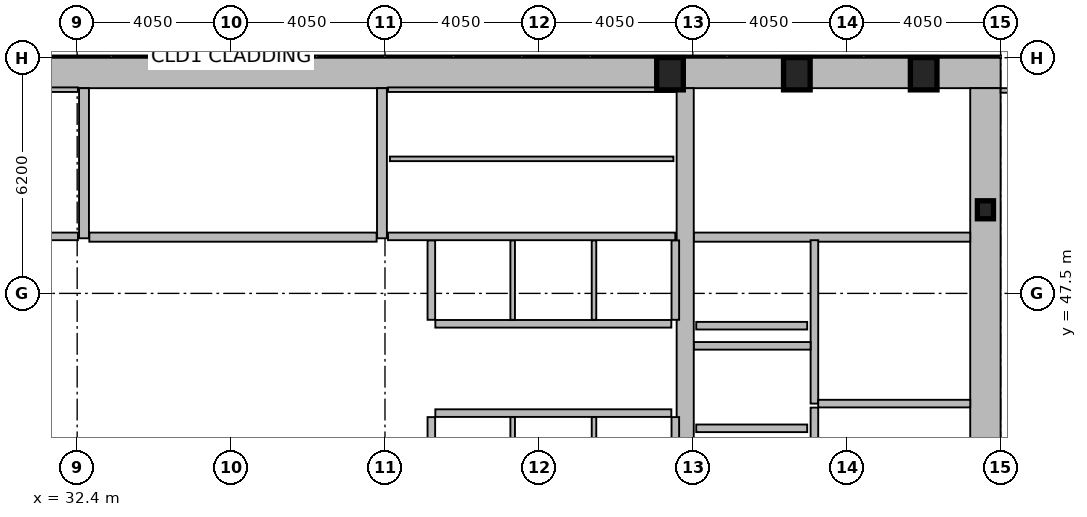
"""IFC4 building model, lengths in metres.
Left out: names, types, materials, properties, quantities, classifications, styles, units other than length and angle.
Written with IfcOpenShell. Run it as: python <this file> out.ifc"""

import sys

from ifc_helpers import new_model, si_unit, direction, frame, frame_2d, origin, origin_2d, place, context, subcontext, project, spatial, rectangle, hollow_rectangle, i_section, extrude, element, fill, save


model = new_model("IFC4")
c1 = context("Model", 3, precision=1e-05, world=origin(), true_north=direction((0.0, 1.0)))
c2 = subcontext(c1, "Body", "Model", "MODEL_VIEW")
j1 = project(units=[si_unit("LENGTHUNIT", "METRE"), si_unit("PLANEANGLEUNIT", "RADIAN")], contexts=[c1])
p1 = place(None, origin())
s1 = spatial("IfcSite", under=j1, at=p1, CompositionType="ELEMENT")
p2 = place(p1, origin())
s2 = spatial("IfcBuilding", under=s1, at=p2, CompositionType="ELEMENT")
p3 = place(p2, frame((0.0, 0.0, 85.8)))
s3 = spatial("IfcBuildingStorey", under=s2, at=p3, CompositionType="ELEMENT", Elevation=85.8)
p4 = place(p3, frame((16.2, 53.3, 0.0), z_axis=(0.0, 0.0, 1.0), x_axis=(1.0, 0.0, 0.0)))
e1 = element("IfcWall", 1, at=p4, inside=s3, PredefinedType="SHEAR", context=c2, shape_type="SweptSolid", body=[
    extrude(rectangle(XDim=40.5, YDim=0.8, at=frame_2d((20.25, 0.0))), origin(), (0.0, 0.0, 1.0), 4.62),
])
p5 = place(p3, frame((56.3, 52.9, 0.0), z_axis=(0.0, 0.0, 1.0), x_axis=(0.0, -1.0, 0.0)))
e2 = element("IfcWall", 2, at=p5, inside=s3, PredefinedType="SHEAR", context=c2, shape_type="SweptSolid", body=[
    extrude(rectangle(XDim=10.8, YDim=0.8, at=frame_2d((5.4, 0.0))), origin(), (0.0, 0.0, 1.0), 4.62),
])
p6 = place(p3, frame((48.4, 42.1, 0.0), z_axis=(0.0, 0.0, 1.0), x_axis=(0.0, 1.0, 0.0)))
e3 = element("IfcWall", 3, at=p6, inside=s3, PredefinedType="SHEAR", context=c2, shape_type="SweptSolid", body=[
    extrude(rectangle(XDim=10.8, YDim=0.45, at=frame_2d((5.4, 0.0))), origin(), (0.0, 0.0, 1.0), 4.62),
])
for number, where, z_axis, x_axis in (
    (4, (32.58, 48.95, 0.0), (0.0, 0.0, 1.0), (0.0, 1.0, 0.0)),
    (5, (40.42, 48.95, 0.0), (0.0, 0.0, 1.0), (0.0, 1.0, 0.0)),
):
    element("IfcWall", number, at=place(p3, frame(where, z_axis=z_axis, x_axis=x_axis)), inside=s3, PredefinedType="SHEAR", context=c2, shape_type="SweptSolid", body=[
        extrude(rectangle(XDim=3.95, YDim=0.26, at=frame_2d((1.975, 0.0))), origin(), (0.0, 0.0, 1.0), 4.62),
    ])
p7 = place(p3, frame((48.63, 48.98, 0.0), z_axis=(0.0, 0.0, 1.0), x_axis=(1.0, 0.0, 0.0)))
e6 = element("IfcWall", 6, at=p7, inside=s3, PredefinedType="SHEAR", context=c2, shape_type="SweptSolid", body=[
    extrude(rectangle(XDim=7.27, YDim=0.24, at=frame_2d((3.635, 0.0))), origin(), (0.0, 0.0, 1.0), 4.62),
])
p8 = place(p7, frame((6.0, 0.0, 0.0)))
e7 = element("IfcOpeningElement", 7, at=p8, cuts=e6, PredefinedType="OPENING", context=c2, shape_type="SweptSolid", body=[
    extrude(rectangle(XDim=1.05, YDim=2.15, at=frame_2d((0.525, 1.075))), frame((0.0, 0.13, 0.0), z_axis=(0.0, -1.0, 0.0), x_axis=(1.0, 0.0, 0.0)), (0.0, 0.0, 1.0), 0.26),
])
p9 = place(p3, frame((32.72, 48.98, 0.0), z_axis=(0.0, 0.0, 1.0), x_axis=(1.0, 0.0, 0.0)))
e8 = element("IfcWall", 8, at=p9, inside=s3, PredefinedType="SHEAR", context=c2, shape_type="SweptSolid", body=[
    extrude(rectangle(XDim=7.56, YDim=0.24, at=frame_2d((3.78, 0.0))), origin(), (0.0, 0.0, 1.0), 4.62),
])
p10 = place(p9, frame((0.22, 0.0, 0.0)))
e9 = element("IfcOpeningElement", 9, at=p10, cuts=e8, PredefinedType="OPENING", context=c2, shape_type="SweptSolid", body=[
    extrude(rectangle(XDim=1.05, YDim=2.15, at=frame_2d((0.525, 1.075))), frame((0.0, 0.13, 0.0), z_axis=(0.0, -1.0, 0.0), x_axis=(1.0, 0.0, 0.0)), (0.0, 0.0, 1.0), 0.26),
])
for number, where, z_axis, x_axis in (
    (10, (48.0, 53.28, 0.0), (0.0, 0.0, 1.0), (1.0, 0.0, 0.0)),
    (11, (51.337, 53.28, 0.0), (0.0, 0.0, 1.0), (1.0, 0.0, 0.0)),
    (12, (54.675, 53.28, 0.0), (0.0, 0.0, 1.0), (1.0, 0.0, 0.0)),
):
    element("IfcColumn", number, at=place(p3, frame(where, z_axis=z_axis, x_axis=x_axis)), inside=s3, PredefinedType="COLUMN", context=c2, shape_type="SweptSolid", body=[
        extrude(hollow_rectangle(XDim=0.7, YDim=0.85, WallThickness=0.05, at=origin_2d()), origin(), (0.0, 0.0, 1.0), 4.8),
    ])
p11 = place(p3, frame((56.3, 49.7, 0.0), z_axis=(0.0, 0.0, 1.0), x_axis=(1.0, 0.0, 0.0)))
e13 = element("IfcColumn", 13, at=p11, inside=s3, PredefinedType="COLUMN", context=c2, shape_type="SweptSolid", body=[
    extrude(i_section(OverallWidth=0.424, OverallDepth=0.474, WebThickness=0.048, FlangeThickness=0.077, at=origin_2d()), origin(), (0.0, 0.0, 1.0), 4.8),
])
p12 = place(p3, frame((51.61, 43.95, 0.0), z_axis=(0.0, 0.0, 1.0), x_axis=(-1.0, 0.0, 0.0)))
e14 = element("IfcWall", 14, at=p12, inside=s3, PredefinedType="PARTITIONING", context=c2, shape_type="SweptSolid", body=[
    extrude(rectangle(XDim=2.92, YDim=0.2, at=frame_2d((1.46, 0.0))), origin(), (0.0, 0.0, 1.0), 4.62),
])
p13 = place(p12, frame((0.81, 0.0, 0.0)))
e15 = element("IfcOpeningElement", 15, at=p13, cuts=e14, PredefinedType="OPENING", context=c2, shape_type="SweptSolid", body=[
    extrude(rectangle(XDim=1.3, YDim=2.18, at=frame_2d((0.65, 1.09))), frame((0.0, 0.11, 0.0), z_axis=(0.0, -1.0, 0.0), x_axis=(1.0, 0.0, 0.0)), (0.0, 0.0, 1.0), 0.22),
])
p14 = place(p3, frame((51.61, 46.65, 0.0), z_axis=(0.0, 0.0, 1.0), x_axis=(-1.0, 0.0, 0.0)))
e16 = element("IfcWall", 16, at=p14, inside=s3, PredefinedType="PARTITIONING", context=c2, shape_type="SweptSolid", body=[
    extrude(rectangle(XDim=2.92, YDim=0.2, at=frame_2d((1.46, 0.0))), origin(), (0.0, 0.0, 1.0), 4.62),
])
p15 = place(p14, frame((0.86, 0.0, 0.0)))
e17 = element("IfcOpeningElement", 17, at=p15, cuts=e16, PredefinedType="OPENING", context=c2, shape_type="SweptSolid", body=[
    extrude(rectangle(XDim=1.2, YDim=2.18, at=frame_2d((0.6, 1.09))), frame((0.0, 0.11, 0.0), z_axis=(0.0, -1.0, 0.0), x_axis=(1.0, 0.0, 0.0)), (0.0, 0.0, 1.0), 0.22),
])
p16 = place(p3, frame((51.8, 44.6, 0.0), z_axis=(0.0, 0.0, 1.0), x_axis=(0.0, 1.0, 0.0)))
e18 = element("IfcWall", 18, at=p16, inside=s3, PredefinedType="PARTITIONING", context=c2, shape_type="SweptSolid", body=[
    extrude(rectangle(XDim=4.3, YDim=0.2, at=frame_2d((2.15, 0.0))), origin(), (0.0, 0.0, 1.0), 4.62),
])
p17 = place(p3, frame((51.9, 44.6, 0.0), z_axis=(0.0, 0.0, 1.0), x_axis=(1.0, 0.0, 0.0)))
e19 = element("IfcWall", 19, at=p17, inside=s3, PredefinedType="PARTITIONING", context=c2, shape_type="SweptSolid", body=[
    extrude(rectangle(XDim=4.0, YDim=0.2, at=frame_2d((2.0, 0.0))), origin(), (0.0, 0.0, 1.0), 4.62),
])
p18 = place(p17, frame((1.15, 0.0, 0.0)))
e20 = element("IfcOpeningElement", 20, at=p18, cuts=e19, PredefinedType="OPENING", context=c2, shape_type="SweptSolid", body=[
    extrude(rectangle(XDim=1.05, YDim=2.15, at=frame_2d((0.525, 1.075))), frame((0.0, 0.11, 0.0), z_axis=(0.0, -1.0, 0.0), x_axis=(1.0, 0.0, 0.0)), (0.0, 0.0, 1.0), 0.22),
])
p19 = place(p3, frame((48.63, 46.12, 0.0), z_axis=(0.0, 0.0, 1.0), x_axis=(1.0, 0.0, 0.0)))
e21 = element("IfcWall", 21, at=p19, inside=s3, PredefinedType="PARTITIONING", context=c2, shape_type="SweptSolid", body=[
    extrude(rectangle(XDim=3.07, YDim=0.2, at=frame_2d((1.535, 0.0))), origin(), (0.0, 0.0, 1.0), 4.62),
])
p20 = place(p3, frame((51.8, 42.1, 0.0), z_axis=(0.0, 0.0, 1.0), x_axis=(0.0, 1.0, 0.0)))
e22 = element("IfcWall", 22, at=p20, inside=s3, PredefinedType="PARTITIONING", context=c2, shape_type="SweptSolid", body=[
    extrude(rectangle(XDim=2.395, YDim=0.2, at=frame_2d((1.198, 0.0))), origin(), (0.0, 0.0, 1.0), 4.62),
])
p21 = place(p20, frame((0.38, 0.0, 0.0)))
e23 = element("IfcOpeningElement", 23, at=p21, cuts=e22, PredefinedType="OPENING", context=c2, shape_type="SweptSolid", body=[
    extrude(rectangle(XDim=1.05, YDim=2.15, at=frame_2d((0.525, 1.075))), frame((0.0, 0.11, 0.0), z_axis=(0.0, -1.0, 0.0), x_axis=(1.0, 0.0, 0.0)), (0.0, 0.0, 1.0), 0.22),
])
p22 = place(p3, frame((41.825, 46.7, 0.0), z_axis=(0.0, 0.0, 1.0), x_axis=(1.0, 0.0, 0.0)))
e24 = element("IfcWall", 24, at=p22, inside=s3, PredefinedType="PARTITIONING", context=c2, shape_type="SweptSolid", body=[
    extrude(rectangle(XDim=6.21, YDim=0.2, at=frame_2d((3.105, 0.0))), origin(), (0.0, 0.0, 1.0), 4.62),
])
for number, where, z_axis, x_axis in (
    (25, (41.72, 46.805, 0.0), (0.0, 0.0, 1.0), (0.0, 1.0, 0.0)),
    (26, (48.14, 46.805, 0.0), (0.0, 0.0, 1.0), (0.0, 1.0, 0.0)),
):
    element("IfcWall", number, at=place(p3, frame(where, z_axis=z_axis, x_axis=x_axis)), inside=s3, PredefinedType="PARTITIONING", context=c2, shape_type="SweptSolid", body=[
        extrude(rectangle(XDim=2.09, YDim=0.2, at=frame_2d((1.045, 0.0))), origin(), (0.0, 0.0, 1.0), 4.62),
    ])
for number, where, z_axis, x_axis in (
    (27, (43.86, 46.805, 0.0), (0.0, 0.0, 1.0), (0.0, 1.0, 0.0)),
    (28, (46.0, 46.805, 0.0), (0.0, 0.0, 1.0), (0.0, 1.0, 0.0)),
):
    element("IfcWall", number, at=place(p3, frame(where, z_axis=z_axis, x_axis=x_axis)), inside=s3, PredefinedType="PARTITIONING", context=c2, shape_type="SweptSolid", body=[
        extrude(rectangle(XDim=2.09, YDim=0.12, at=frame_2d((1.045, 0.0))), origin(), (0.0, 0.0, 1.0), 4.62),
    ])
p23 = place(p3, frame((41.825, 44.35, 0.0), z_axis=(0.0, 0.0, 1.0), x_axis=(1.0, 0.0, 0.0)))
e29 = element("IfcWall", 29, at=p23, inside=s3, PredefinedType="PARTITIONING", context=c2, shape_type="SweptSolid", body=[
    extrude(rectangle(XDim=6.21, YDim=0.2, at=frame_2d((3.105, 0.0))), origin(), (0.0, 0.0, 1.0), 4.62),
])
for number, where, z_axis, x_axis in (
    (30, (41.72, 42.15, 0.0), (0.0, 0.0, 1.0), (0.0, 1.0, 0.0)),
    (31, (48.14, 42.15, 0.0), (0.0, 0.0, 1.0), (0.0, 1.0, 0.0)),
):
    element("IfcWall", number, at=place(p3, frame(where, z_axis=z_axis, x_axis=x_axis)), inside=s3, PredefinedType="PARTITIONING", context=c2, shape_type="SweptSolid", body=[
        extrude(rectangle(XDim=2.095, YDim=0.2, at=frame_2d((1.048, 0.0))), origin(), (0.0, 0.0, 1.0), 4.62),
    ])
for number, where, z_axis, x_axis in (
    (32, (43.86, 42.15, 0.0), (0.0, 0.0, 1.0), (0.0, 1.0, 0.0)),
    (33, (46.0, 42.15, 0.0), (0.0, 0.0, 1.0), (0.0, 1.0, 0.0)),
):
    element("IfcWall", number, at=place(p3, frame(where, z_axis=z_axis, x_axis=x_axis)), inside=s3, PredefinedType="PARTITIONING", context=c2, shape_type="SweptSolid", body=[
        extrude(rectangle(XDim=2.095, YDim=0.12, at=frame_2d((1.048, 0.0))), origin(), (0.0, 0.0, 1.0), 4.62),
    ])
p24 = place(p3, frame((24.7, 52.86, 0.0), z_axis=(0.0, 0.0, 1.0), x_axis=(1.0, 0.0, 0.0)))
e34 = element("IfcWall", 34, at=p24, inside=s3, PredefinedType="PARTITIONING", context=c2, shape_type="SweptSolid", body=[
    extrude(rectangle(XDim=7.72, YDim=0.12, at=frame_2d((3.86, 0.0))), origin(), (0.0, 0.0, 1.0), 4.62),
])
p25 = place(p3, frame((24.7, 49.0, 0.0), z_axis=(0.0, 0.0, 1.0), x_axis=(1.0, 0.0, 0.0)))
e35 = element("IfcWall", 35, at=p25, inside=s3, PredefinedType="PARTITIONING", context=c2, shape_type="SweptSolid", body=[
    extrude(rectangle(XDim=7.72, YDim=0.2, at=frame_2d((3.86, 0.0))), origin(), (0.0, 0.0, 1.0), 4.62),
])
p26 = place(p25, frame((6.56, 0.0, 0.0)))
e36 = element("IfcOpeningElement", 36, at=p26, cuts=e35, PredefinedType="OPENING", context=c2, shape_type="SweptSolid", body=[
    extrude(rectangle(XDim=0.95, YDim=2.1, at=frame_2d((0.475, 1.05))), frame((0.0, 0.11, 0.0), z_axis=(0.0, -1.0, 0.0), x_axis=(1.0, 0.0, 0.0)), (0.0, 0.0, 1.0), 0.22),
])
p27 = place(p3, frame((40.58, 52.86, 0.0), z_axis=(0.0, 0.0, 1.0), x_axis=(1.0, 0.0, 0.0)))
e37 = element("IfcWall", 37, at=p27, inside=s3, PredefinedType="PARTITIONING", context=c2, shape_type="SweptSolid", body=[
    extrude(rectangle(XDim=7.56, YDim=0.12, at=frame_2d((3.78, 0.0))), origin(), (0.0, 0.0, 1.0), 4.62),
])
p28 = place(p3, frame((40.58, 49.0, 0.0), z_axis=(0.0, 0.0, 1.0), x_axis=(1.0, 0.0, 0.0)))
e38 = element("IfcWall", 38, at=p28, inside=s3, PredefinedType="PARTITIONING", context=c2, shape_type="SweptSolid", body=[
    extrude(rectangle(XDim=7.56, YDim=0.2, at=frame_2d((3.78, 0.0))), origin(), (0.0, 0.0, 1.0), 4.62),
])
p29 = place(p28, frame((0.16, 0.0, 0.0)))
e39 = element("IfcOpeningElement", 39, at=p29, cuts=e38, PredefinedType="OPENING", context=c2, shape_type="SweptSolid", body=[
    extrude(rectangle(XDim=0.95, YDim=2.1, at=frame_2d((0.475, 1.05))), frame((0.0, 0.11, 0.0), z_axis=(0.0, -1.0, 0.0), x_axis=(1.0, 0.0, 0.0)), (0.0, 0.0, 1.0), 0.22),
])
p30 = place(p3, frame((40.63, 51.04, 0.0), z_axis=(0.0, 0.0, 1.0), x_axis=(1.0, 0.0, 0.0)))
e40 = element("IfcWall", 40, at=p30, inside=s3, PredefinedType="PARTITIONING", context=c2, shape_type="SweptSolid", body=[
    extrude(rectangle(XDim=7.46, YDim=0.12, at=frame_2d((3.73, 0.0))), origin(), (0.0, 0.0, 1.0), 4.62),
])
p31 = place(p30, frame((2.4, 0.0, 0.0)))
e41 = element("IfcOpeningElement", 41, at=p31, cuts=e40, PredefinedType="OPENING", context=c2, shape_type="SweptSolid", body=[
    extrude(rectangle(XDim=0.9, YDim=2.05, at=frame_2d((0.45, 1.025))), frame((0.0, 0.07, 0.0), z_axis=(0.0, -1.0, 0.0), x_axis=(1.0, 0.0, 0.0)), (0.0, 0.0, 1.0), 0.14),
])
p32 = place(p3, frame((56.7, 52.84, 0.0), z_axis=(0.0, 0.0, 1.0), x_axis=(1.0, 0.0, 0.0)))
e42 = element("IfcWall", 42, at=p32, inside=s3, PredefinedType="PARTITIONING", context=c2, shape_type="SweptSolid", body=[
    extrude(rectangle(XDim=12.105, YDim=0.12, at=frame_2d((6.052, 0.0))), origin(), (0.0, 0.0, 1.0), 4.62),
])
p33 = place(p8, origin())
e43 = element("IfcDoor", 43, at=p33, inside=s3, OperationType="SINGLE_SWING_RIGHT", PredefinedType="DOOR", context=c2, shape_type="SweptSolid", body=[
    extrude(rectangle(XDim=1.05, YDim=2.15, at=frame_2d((0.525, 1.075))), frame((0.0, 0.025, 0.0), z_axis=(0.0, -1.0, 0.0), x_axis=(1.0, 0.0, 0.0)), (0.0, 0.0, 1.0), 0.05),
])
fill(e7, e43)
p34 = place(p10, origin())
e44 = element("IfcDoor", 44, at=p34, inside=s3, OperationType="SINGLE_SWING_LEFT", PredefinedType="DOOR", context=c2, shape_type="SweptSolid", body=[
    extrude(rectangle(XDim=1.05, YDim=2.15, at=frame_2d((0.525, 1.075))), frame((0.0, 0.025, 0.0), z_axis=(0.0, -1.0, 0.0), x_axis=(1.0, 0.0, 0.0)), (0.0, 0.0, 1.0), 0.05),
])
fill(e9, e44)
p35 = place(p13, origin())
e45 = element("IfcDoor", 45, at=p35, inside=s3, OperationType="SLIDING_TO_LEFT", PredefinedType="DOOR", context=c2, shape_type="SweptSolid", body=[
    extrude(rectangle(XDim=1.3, YDim=2.18, at=frame_2d((0.65, 1.09))), frame((0.0, 0.025, 0.0), z_axis=(0.0, -1.0, 0.0), x_axis=(1.0, 0.0, 0.0)), (0.0, 0.0, 1.0), 0.05),
])
fill(e15, e45)
p36 = place(p15, origin())
e46 = element("IfcDoor", 46, at=p36, inside=s3, OperationType="SLIDING_TO_LEFT", PredefinedType="DOOR", context=c2, shape_type="SweptSolid", body=[
    extrude(rectangle(XDim=1.2, YDim=2.18, at=frame_2d((0.6, 1.09))), frame((0.0, 0.025, 0.0), z_axis=(0.0, -1.0, 0.0), x_axis=(1.0, 0.0, 0.0)), (0.0, 0.0, 1.0), 0.05),
])
fill(e17, e46)
p37 = place(p18, origin())
e47 = element("IfcDoor", 47, at=p37, inside=s3, OperationType="SINGLE_SWING_RIGHT", PredefinedType="DOOR", context=c2, shape_type="SweptSolid", body=[
    extrude(rectangle(XDim=1.05, YDim=2.15, at=frame_2d((0.525, 1.075))), frame((0.0, 0.025, 0.0), z_axis=(0.0, -1.0, 0.0), x_axis=(1.0, 0.0, 0.0)), (0.0, 0.0, 1.0), 0.05),
])
fill(e20, e47)
p38 = place(p26, origin())
e48 = element("IfcDoor", 48, at=p38, inside=s3, OperationType="SINGLE_SWING_RIGHT", PredefinedType="DOOR", context=c2, shape_type="SweptSolid", body=[
    extrude(rectangle(XDim=0.95, YDim=2.1, at=frame_2d((0.475, 1.05))), frame((0.0, 0.025, 0.0), z_axis=(0.0, -1.0, 0.0), x_axis=(1.0, 0.0, 0.0)), (0.0, 0.0, 1.0), 0.05),
])
fill(e36, e48)
p39 = place(p29, origin())
e49 = element("IfcDoor", 49, at=p39, inside=s3, OperationType="SINGLE_SWING_RIGHT", PredefinedType="DOOR", context=c2, shape_type="SweptSolid", body=[
    extrude(rectangle(XDim=0.95, YDim=2.1, at=frame_2d((0.475, 1.05))), frame((0.0, 0.025, 0.0), z_axis=(0.0, -1.0, 0.0), x_axis=(1.0, 0.0, 0.0)), (0.0, 0.0, 1.0), 0.05),
])
fill(e39, e49)
p40 = place(p31, origin())
e50 = element("IfcDoor", 50, at=p40, inside=s3, OperationType="SINGLE_SWING_LEFT", PredefinedType="DOOR", context=c2, shape_type="SweptSolid", body=[
    extrude(rectangle(XDim=0.9, YDim=2.05, at=frame_2d((0.45, 1.025))), frame((0.0, 0.025, 0.0), z_axis=(0.0, -1.0, 0.0), x_axis=(1.0, 0.0, 0.0)), (0.0, 0.0, 1.0), 0.05),
])
fill(e41, e50)
save(model, sys.argv[1])
